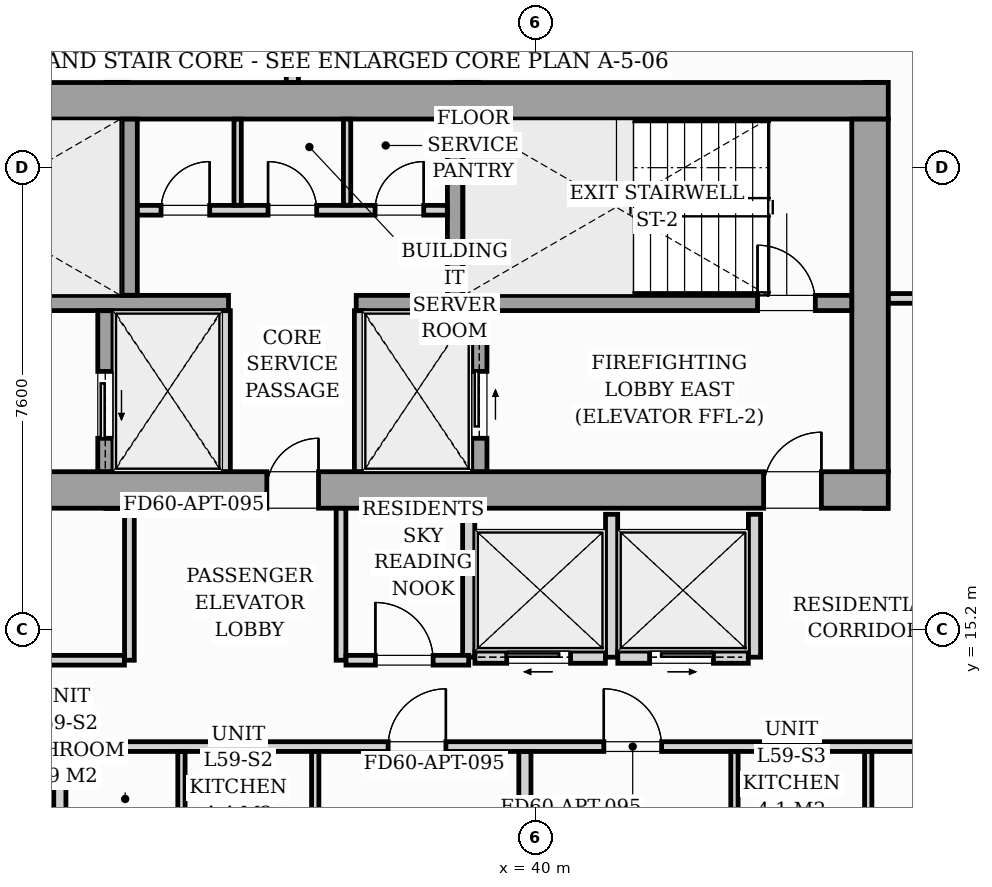
"""IFC4 building model, lengths in metres.
Left out: names, types, materials, properties, quantities, classifications, styles, units other than length and angle.
Written with IfcOpenShell. Run it as: python <this file> out.ifc"""

import sys

from ifc_helpers import new_model, si_unit, direction, frame, frame_2d, origin, origin_2d, place, context, subcontext, project, spatial, rectangle, i_section, extrude, source, transform, mapped, element, fill, save


model = new_model("IFC4")
c1 = context("Model", 3, precision=1e-05, world=origin(), true_north=direction((0.0, 1.0)))
c2 = subcontext(c1, "Body", "Model", "MODEL_VIEW")
j1 = project(units=[si_unit("LENGTHUNIT", "METRE"), si_unit("PLANEANGLEUNIT", "RADIAN")], contexts=[c1])
p1 = place(None, origin())
s1 = spatial("IfcSite", under=j1, at=p1, CompositionType="ELEMENT")
p2 = place(p1, origin())
s2 = spatial("IfcBuilding", under=s1, at=p2, CompositionType="ELEMENT")
p3 = place(p2, frame((0.0, 0.0, 205.0)))
s3 = spatial("IfcBuildingStorey", under=s2, at=p3, CompositionType="ELEMENT", Elevation=205.0)
m1 = source(origin(), c2, "Body", "SweptSolid", [
    extrude(i_section(OverallWidth=0.416, OverallDepth=0.446, WebThickness=0.039, FlangeThickness=0.063, FilletRadius=0.018, at=origin_2d()), origin(), (0.0, 0.0, 1.0), 3.196),
])
for number, where, z_axis, x_axis in (
    (1, (33.12, 17.4, 0.002), (0.0, 0.0, 1.0), (1.0, 0.0, 0.0)),
    (2, (38.88, 17.4, 0.002), (0.0, 0.0, 1.0), (1.0, 0.0, 0.0)),
    (3, (45.6, 17.4, 0.002), (0.0, 0.0, 1.0), (1.0, 0.0, 0.0)),
    (4, (33.12, 24.0, 0.002), (0.0, 0.0, 1.0), (1.0, 0.0, 0.0)),
    (5, (38.88, 24.0, 0.002), (0.0, 0.0, 1.0), (1.0, 0.0, 0.0)),
    (6, (45.6, 24.0, 0.002), (0.0, 0.0, 1.0), (1.0, 0.0, 0.0)),
):
    element("IfcColumn", number, at=place(p3, frame(where, z_axis=z_axis, x_axis=x_axis)), inside=s3, PredefinedType="PILASTER", context=c2, shape_type="MappedRepresentation", body=[
        mapped(m1, transform((0.0, 0.0, 0.0), scale=1.0)),
    ])
p4 = place(p3, frame((26.2, 17.5, 0.0), z_axis=(0.0, 0.0, 1.0), x_axis=(1.0, 0.0, 0.0)))
e7 = element("IfcWall", 7, at=p4, inside=s3, PredefinedType="SHEAR", context=c2, shape_type="SweptSolid", body=[
    extrude(rectangle(XDim=19.6, YDim=0.6, at=frame_2d((9.8, 0.0))), origin(), (0.0, 0.0, 1.0), 3.2),
])
p5 = place(p4, frame((0.95, 0.0, 0.0)))
e8 = element("IfcOpeningElement", 8, at=p5, cuts=e7, PredefinedType="OPENING", context=c2, shape_type="SweptSolid", body=[
    extrude(rectangle(XDim=0.95, YDim=2.06, at=frame_2d((0.475, 1.03))), frame((0.0, 0.31, 0.0), z_axis=(0.0, -1.0, 0.0), x_axis=(1.0, 0.0, 0.0)), (0.0, 0.0, 1.0), 0.62),
])
p6 = place(p4, frame((9.38, 0.0, 0.0)))
e9 = element("IfcOpeningElement", 9, at=p6, cuts=e7, PredefinedType="OPENING", context=c2, shape_type="SweptSolid", body=[
    extrude(rectangle(XDim=0.85, YDim=2.0, at=frame_2d((0.425, 1.0))), frame((0.0, 0.31, 0.0), z_axis=(0.0, -1.0, 0.0), x_axis=(1.0, 0.0, 0.0)), (0.0, 0.0, 1.0), 0.62),
])
p7 = place(p4, frame((17.55, 0.0, 0.0)))
e10 = element("IfcOpeningElement", 10, at=p7, cuts=e7, PredefinedType="OPENING", context=c2, shape_type="SweptSolid", body=[
    extrude(rectangle(XDim=0.95, YDim=2.06, at=frame_2d((0.475, 1.03))), frame((0.0, 0.31, 0.0), z_axis=(0.0, -1.0, 0.0), x_axis=(1.0, 0.0, 0.0)), (0.0, 0.0, 1.0), 0.62),
])
p8 = place(p3, frame((26.2, 23.9, 0.0), z_axis=(0.0, 0.0, 1.0), x_axis=(1.0, 0.0, 0.0)))
e11 = element("IfcWall", 11, at=p8, inside=s3, PredefinedType="SHEAR", context=c2, shape_type="SweptSolid", body=[
    extrude(rectangle(XDim=19.6, YDim=0.6, at=frame_2d((9.8, 0.0))), origin(), (0.0, 0.0, 1.0), 3.2),
])
p9 = place(p3, frame((45.5, 17.802, 0.0), z_axis=(0.0, 0.0, 1.0), x_axis=(0.0, 1.0, 0.0)))
e12 = element("IfcWall", 12, at=p9, inside=s3, PredefinedType="SHEAR", context=c2, shape_type="SweptSolid", body=[
    extrude(rectangle(XDim=5.796, YDim=0.6, at=frame_2d((2.898, 0.0))), origin(), (0.0, 0.0, 1.0), 3.2),
])
p10 = place(p3, frame((26.802, 20.575, 0.0), z_axis=(0.0, 0.0, 1.0), x_axis=(1.0, 0.0, 0.0)))
e13 = element("IfcWall", 13, at=p10, inside=s3, PredefinedType="SOLIDWALL", context=c2, shape_type="SweptSolid", body=[
    extrude(rectangle(XDim=8.148, YDim=0.25, at=frame_2d((4.074, 0.0))), origin(), (0.0, 0.0, 1.0), 3.2),
])
p11 = place(p10, frame((0.298, 0.0, 0.0)))
e14 = element("IfcOpeningElement", 14, at=p11, cuts=e13, PredefinedType="OPENING", context=c2, shape_type="SweptSolid", body=[
    extrude(rectangle(XDim=0.95, YDim=2.06, at=frame_2d((0.475, 1.03))), frame((0.0, 0.135, 0.0), z_axis=(0.0, -1.0, 0.0), x_axis=(1.0, 0.0, 0.0)), (0.0, 0.0, 1.0), 0.27),
])
p12 = place(p3, frame((37.05, 20.575, 0.0), z_axis=(0.0, 0.0, 1.0), x_axis=(1.0, 0.0, 0.0)))
e15 = element("IfcWall", 15, at=p12, inside=s3, PredefinedType="SOLIDWALL", context=c2, shape_type="SweptSolid", body=[
    extrude(rectangle(XDim=8.148, YDim=0.25, at=frame_2d((4.074, 0.0))), origin(), (0.0, 0.0, 1.0), 3.2),
])
p13 = place(p12, frame((6.6, 0.0, 0.0)))
e16 = element("IfcOpeningElement", 16, at=p13, cuts=e15, PredefinedType="OPENING", context=c2, shape_type="SweptSolid", body=[
    extrude(rectangle(XDim=0.95, YDim=2.06, at=frame_2d((0.475, 1.03))), frame((0.0, 0.135, 0.0), z_axis=(0.0, -1.0, 0.0), x_axis=(1.0, 0.0, 0.0)), (0.0, 0.0, 1.0), 0.27),
])
for number, where, z_axis, x_axis in (
    (17, (33.325, 20.702, 0.0), (0.0, 0.0, 1.0), (0.0, 1.0, 0.0)),
    (18, (38.675, 20.702, 0.0), (0.0, 0.0, 1.0), (0.0, 1.0, 0.0)),
):
    element("IfcWall", number, at=place(p3, frame(where, z_axis=z_axis, x_axis=x_axis)), inside=s3, PredefinedType="SOLIDWALL", context=c2, shape_type="SweptSolid", body=[
        extrude(rectangle(XDim=2.896, YDim=0.25, at=frame_2d((1.448, 0.0))), origin(), (0.0, 0.0, 1.0), 3.2),
    ])
p14 = place(p3, frame((32.925, 17.802, 0.0), z_axis=(0.0, 0.0, 1.0), x_axis=(0.0, 1.0, 0.0)))
e19 = element("IfcWall", 19, at=p14, inside=s3, PredefinedType="SOLIDWALL", context=c2, shape_type="SweptSolid", body=[
    extrude(rectangle(XDim=2.646, YDim=0.25, at=frame_2d((1.323, 0.0))), origin(), (0.0, 0.0, 1.0), 3.2),
])
p15 = place(p14, frame((0.548, 0.0, 0.0)))
e20 = element("IfcOpeningElement", 20, at=p15, cuts=e19, PredefinedType="OPENING", context=c2, shape_type="SweptSolid", body=[
    extrude(rectangle(XDim=1.1, YDim=2.08, at=frame_2d((0.55, 1.04))), frame((0.0, 0.135, 0.0), z_axis=(0.0, -1.0, 0.0), x_axis=(1.0, 0.0, 0.0)), (0.0, 0.0, 1.0), 0.27),
])
for number, where, z_axis, x_axis in (
    (21, (34.9, 17.802, 0.0), (0.0, 0.0, 1.0), (0.0, 1.0, 0.0)),
    (22, (37.1, 17.802, 0.0), (0.0, 0.0, 1.0), (0.0, 1.0, 0.0)),
):
    element("IfcWall", number, at=place(p3, frame(where, z_axis=z_axis, x_axis=x_axis)), inside=s3, PredefinedType="PARTITIONING", context=c2, shape_type="SweptSolid", body=[
        extrude(rectangle(XDim=2.646, YDim=0.16, at=frame_2d((1.323, 0.0))), origin(), (0.0, 0.0, 1.0), 2.94),
    ])
p16 = place(p3, frame((39.075, 17.802, 0.0), z_axis=(0.0, 0.0, 1.0), x_axis=(0.0, 1.0, 0.0)))
e23 = element("IfcWall", 23, at=p16, inside=s3, PredefinedType="SOLIDWALL", context=c2, shape_type="SweptSolid", body=[
    extrude(rectangle(XDim=2.646, YDim=0.25, at=frame_2d((1.323, 0.0))), origin(), (0.0, 0.0, 1.0), 3.2),
])
p17 = place(p16, frame((0.548, 0.0, 0.0)))
e24 = element("IfcOpeningElement", 24, at=p17, cuts=e23, PredefinedType="OPENING", context=c2, shape_type="SweptSolid", body=[
    extrude(rectangle(XDim=1.1, YDim=2.08, at=frame_2d((0.55, 1.04))), frame((0.0, 0.135, 0.0), z_axis=(0.0, -1.0, 0.0), x_axis=(1.0, 0.0, 0.0)), (0.0, 0.0, 1.0), 0.27),
])
p18 = place(p3, frame((33.452, 22.1, 0.0), z_axis=(0.0, 0.0, 1.0), x_axis=(1.0, 0.0, 0.0)))
e25 = element("IfcWall", 25, at=p18, inside=s3, PredefinedType="PARTITIONING", context=c2, shape_type="SweptSolid", body=[
    extrude(rectangle(XDim=5.096, YDim=0.16, at=frame_2d((2.548, 0.0))), origin(), (0.0, 0.0, 1.0), 2.94),
])
p19 = place(p18, frame((0.388, 0.0, 0.0)))
e26 = element("IfcOpeningElement", 26, at=p19, cuts=e25, PredefinedType="OPENING", context=c2, shape_type="SweptSolid", body=[
    extrude(rectangle(XDim=0.8, YDim=2.05, at=frame_2d((0.4, 1.025))), frame((0.0, 0.09, 0.0), z_axis=(0.0, -1.0, 0.0), x_axis=(1.0, 0.0, 0.0)), (0.0, 0.0, 1.0), 0.18),
])
p20 = place(p18, frame((2.148, 0.0, 0.0)))
e27 = element("IfcOpeningElement", 27, at=p20, cuts=e25, PredefinedType="OPENING", context=c2, shape_type="SweptSolid", body=[
    extrude(rectangle(XDim=0.8, YDim=2.05, at=frame_2d((0.4, 1.025))), frame((0.0, 0.09, 0.0), z_axis=(0.0, -1.0, 0.0), x_axis=(1.0, 0.0, 0.0)), (0.0, 0.0, 1.0), 0.18),
])
p21 = place(p18, frame((3.908, 0.0, 0.0)))
e28 = element("IfcOpeningElement", 28, at=p21, cuts=e25, PredefinedType="OPENING", context=c2, shape_type="SweptSolid", body=[
    extrude(rectangle(XDim=0.8, YDim=2.05, at=frame_2d((0.4, 1.025))), frame((0.0, 0.09, 0.0), z_axis=(0.0, -1.0, 0.0), x_axis=(1.0, 0.0, 0.0)), (0.0, 0.0, 1.0), 0.18),
])
for number, where, z_axis, x_axis in (
    (29, (35.1, 22.182, 0.0), (0.0, 0.0, 1.0), (0.0, 1.0, 0.0)),
    (30, (36.9, 22.182, 0.0), (0.0, 0.0, 1.0), (0.0, 1.0, 0.0)),
):
    element("IfcWall", number, at=place(p3, frame(where, z_axis=z_axis, x_axis=x_axis)), inside=s3, PredefinedType="PARTITIONING", context=c2, shape_type="SweptSolid", body=[
        extrude(rectangle(XDim=1.416, YDim=0.12, at=frame_2d((0.708, 0.0))), origin(), (0.0, 0.0, 1.0), 2.94),
    ])
for number, where, z_axis, x_axis in (
    (31, (38.9, 14.75, 0.0), (0.0, 0.0, 1.0), (0.0, 1.0, 0.0)),
    (32, (41.25, 14.75, 0.0), (0.0, 0.0, 1.0), (0.0, 1.0, 0.0)),
    (33, (43.6, 14.75, 0.0), (0.0, 0.0, 1.0), (0.0, 1.0, 0.0)),
):
    element("IfcWall", number, at=place(p3, frame(where, z_axis=z_axis, x_axis=x_axis)), inside=s3, PredefinedType="PARTITIONING", context=c2, shape_type="SweptSolid", body=[
        extrude(rectangle(XDim=2.35, YDim=0.2, at=frame_2d((1.175, 0.0))), origin(), (0.0, 0.0, 1.0), 2.94),
    ])
p22 = place(p3, frame((39.002, 14.75, 0.0), z_axis=(0.0, 0.0, 1.0), x_axis=(1.0, 0.0, 0.0)))
e34 = element("IfcWall", 34, at=p22, inside=s3, PredefinedType="PARTITIONING", context=c2, shape_type="SweptSolid", body=[
    extrude(rectangle(XDim=2.146, YDim=0.2, at=frame_2d((1.073, 0.0))), origin(), (0.0, 0.0, 1.0), 2.94),
])
p23 = place(p22, frame((0.523, 0.0, 0.0)))
e35 = element("IfcOpeningElement", 35, at=p23, cuts=e34, PredefinedType="OPENING", context=c2, shape_type="SweptSolid", body=[
    extrude(rectangle(XDim=1.05, YDim=2.08, at=frame_2d((0.525, 1.04))), frame((0.0, 0.11, 0.0), z_axis=(0.0, -1.0, 0.0), x_axis=(1.0, 0.0, 0.0)), (0.0, 0.0, 1.0), 0.22),
])
p24 = place(p3, frame((41.352, 14.75, 0.0), z_axis=(0.0, 0.0, 1.0), x_axis=(1.0, 0.0, 0.0)))
e36 = element("IfcWall", 36, at=p24, inside=s3, PredefinedType="PARTITIONING", context=c2, shape_type="SweptSolid", body=[
    extrude(rectangle(XDim=2.146, YDim=0.2, at=frame_2d((1.073, 0.0))), origin(), (0.0, 0.0, 1.0), 2.94),
])
p25 = place(p24, frame((0.523, 0.0, 0.0)))
e37 = element("IfcOpeningElement", 37, at=p25, cuts=e36, PredefinedType="OPENING", context=c2, shape_type="SweptSolid", body=[
    extrude(rectangle(XDim=1.05, YDim=2.08, at=frame_2d((0.525, 1.04))), frame((0.0, 0.11, 0.0), z_axis=(0.0, -1.0, 0.0), x_axis=(1.0, 0.0, 0.0)), (0.0, 0.0, 1.0), 0.22),
])
p26 = place(p3, frame((24.55, 13.28, 0.0), z_axis=(0.0, 0.0, 1.0), x_axis=(1.0, 0.0, 0.0)))
e38 = element("IfcWall", 38, at=p26, inside=s3, PredefinedType="PARTITIONING", context=c2, shape_type="SweptSolid", body=[
    extrude(rectangle(XDim=22.9, YDim=0.16, at=frame_2d((11.45, 0.0))), origin(), (0.0, 0.0, 1.0), 2.94),
])
p27 = place(p26, frame((5.378, 0.0, 0.0)))
e39 = element("IfcOpeningElement", 39, at=p27, cuts=e38, PredefinedType="OPENING", context=c2, shape_type="SweptSolid", body=[
    extrude(rectangle(XDim=0.95, YDim=2.06, at=frame_2d((0.475, 1.03))), frame((0.0, 0.09, 0.0), z_axis=(0.0, -1.0, 0.0), x_axis=(1.0, 0.0, 0.0)), (0.0, 0.0, 1.0), 0.18),
])
p28 = place(p26, frame((13.025, 0.0, 0.0)))
e40 = element("IfcOpeningElement", 40, at=p28, cuts=e38, PredefinedType="OPENING", context=c2, shape_type="SweptSolid", body=[
    extrude(rectangle(XDim=0.95, YDim=2.06, at=frame_2d((0.475, 1.03))), frame((0.0, 0.09, 0.0), z_axis=(0.0, -1.0, 0.0), x_axis=(1.0, 0.0, 0.0)), (0.0, 0.0, 1.0), 0.18),
])
p29 = place(p26, frame((16.572, 0.0, 0.0)))
e41 = element("IfcOpeningElement", 41, at=p29, cuts=e38, PredefinedType="OPENING", context=c2, shape_type="SweptSolid", body=[
    extrude(rectangle(XDim=0.95, YDim=2.06, at=frame_2d((0.475, 1.03))), frame((0.0, 0.09, 0.0), z_axis=(0.0, -1.0, 0.0), x_axis=(1.0, 0.0, 0.0)), (0.0, 0.0, 1.0), 0.18),
])
p30 = place(p3, frame((36.0, 24.202, 0.0), z_axis=(0.0, 0.0, 1.0), x_axis=(0.0, 1.0, 0.0)))
e42 = element("IfcWall", 42, at=p30, inside=s3, PredefinedType="PARTITIONING", context=c2, shape_type="SweptSolid", body=[
    extrude(rectangle(XDim=2.152, YDim=0.2, at=frame_2d((1.076, 0.0))), origin(), (0.0, 0.0, 1.0), 2.94),
])
p31 = place(p3, frame((45.802, 20.65, 0.0), z_axis=(0.0, 0.0, 1.0), x_axis=(1.0, 0.0, 0.0)))
e43 = element("IfcWall", 43, at=p31, inside=s3, PredefinedType="PARTITIONING", context=c2, shape_type="SweptSolid", body=[
    extrude(rectangle(XDim=1.566, YDim=0.16, at=frame_2d((0.783, 0.0))), origin(), (0.0, 0.0, 1.0), 2.94),
])
p32 = place(p3, frame((32.176, 7.844, 0.0), z_axis=(0.0, 0.0, 1.0), x_axis=(0.0, 1.0, 0.0)))
e44 = element("IfcWall", 44, at=p32, inside=s3, PredefinedType="PARTITIONING", context=c2, shape_type="SweptSolid", body=[
    extrude(rectangle(XDim=5.354, YDim=0.2, at=frame_2d((2.677, 0.0))), origin(), (0.0, 0.0, 1.0), 2.94),
])
for number, where, z_axis, x_axis in (
    (45, (36.376, 11.092, 0.0), (0.0, 0.0, 1.0), (0.0, 1.0, 0.0)),
    (46, (34.176, 11.092, 0.0), (0.0, 0.0, 1.0), (0.0, 1.0, 0.0)),
):
    element("IfcWall", number, at=place(p3, frame(where, z_axis=z_axis, x_axis=x_axis)), inside=s3, PredefinedType="PARTITIONING", context=c2, shape_type="SweptSolid", body=[
        extrude(rectangle(XDim=2.106, YDim=0.12, at=frame_2d((1.053, 0.0))), origin(), (0.0, 0.0, 1.0), 2.94),
    ])
p33 = place(p3, frame((39.824, 8.398, 0.0), z_axis=(0.0, 0.0, 1.0), x_axis=(0.0, 1.0, 0.0)))
e47 = element("IfcWall", 47, at=p33, inside=s3, PredefinedType="PARTITIONING", context=c2, shape_type="SweptSolid", body=[
    extrude(rectangle(XDim=4.8, YDim=0.2, at=frame_2d((2.4, 0.0))), origin(), (0.0, 0.0, 1.0), 2.94),
])
for number, where, z_axis, x_axis in (
    (48, (43.27, 11.234, 0.0), (0.0, 0.0, 1.0), (0.0, 1.0, 0.0)),
    (49, (45.47, 11.234, 0.0), (0.0, 0.0, 1.0), (0.0, 1.0, 0.0)),
):
    element("IfcWall", number, at=place(p3, frame(where, z_axis=z_axis, x_axis=x_axis)), inside=s3, PredefinedType="PARTITIONING", context=c2, shape_type="SweptSolid", body=[
        extrude(rectangle(XDim=1.964, YDim=0.12, at=frame_2d((0.982, 0.0))), origin(), (0.0, 0.0, 1.0), 2.94),
    ])
p34 = place(p3, frame((33.32, 14.7, 0.0), z_axis=(0.0, 0.0, 1.0), x_axis=(0.0, 1.0, 0.0)))
e50 = element("IfcWall", 50, at=p34, inside=s3, PredefinedType="PARTITIONING", context=c2, shape_type="SweptSolid", body=[
    extrude(rectangle(XDim=2.498, YDim=0.16, at=frame_2d((1.249, 0.0))), origin(), (0.0, 0.0, 1.0), 2.94),
])
p35 = place(p3, frame((28.442, 14.7, 0.0), z_axis=(0.0, 0.0, 1.0), x_axis=(1.0, 0.0, 0.0)))
e51 = element("IfcWall", 51, at=p35, inside=s3, PredefinedType="PARTITIONING", context=c2, shape_type="SweptSolid", body=[
    extrude(rectangle(XDim=4.796, YDim=0.16, at=frame_2d((2.398, 0.0))), origin(), (0.0, 0.0, 1.0), 2.94),
])
p36 = place(p35, frame((1.923, 0.0, 0.0)))
e52 = element("IfcOpeningElement", 52, at=p36, cuts=e51, PredefinedType="OPENING", context=c2, shape_type="SweptSolid", body=[
    extrude(rectangle(XDim=0.95, YDim=2.06, at=frame_2d((0.475, 1.03))), frame((0.0, 0.09, 0.0), z_axis=(0.0, -1.0, 0.0), x_axis=(1.0, 0.0, 0.0)), (0.0, 0.0, 1.0), 0.18),
])
p37 = place(p3, frame((36.8, 14.7, 0.0), z_axis=(0.0, 0.0, 1.0), x_axis=(0.0, 1.0, 0.0)))
e53 = element("IfcWall", 53, at=p37, inside=s3, PredefinedType="PARTITIONING", context=c2, shape_type="SweptSolid", body=[
    extrude(rectangle(XDim=2.498, YDim=0.16, at=frame_2d((1.249, 0.0))), origin(), (0.0, 0.0, 1.0), 2.94),
])
p38 = place(p3, frame((36.882, 14.7, 0.0), z_axis=(0.0, 0.0, 1.0), x_axis=(1.0, 0.0, 0.0)))
e54 = element("IfcWall", 54, at=p38, inside=s3, PredefinedType="PARTITIONING", context=c2, shape_type="SweptSolid", body=[
    extrude(rectangle(XDim=2.018, YDim=0.16, at=frame_2d((1.009, 0.0))), origin(), (0.0, 0.0, 1.0), 2.94),
])
p39 = place(p38, frame((0.483, 0.0, 0.0)))
e55 = element("IfcOpeningElement", 55, at=p39, cuts=e54, PredefinedType="OPENING", context=c2, shape_type="SweptSolid", body=[
    extrude(rectangle(XDim=0.95, YDim=2.06, at=frame_2d((0.475, 1.03))), frame((0.0, 0.09, 0.0), z_axis=(0.0, -1.0, 0.0), x_axis=(1.0, 0.0, 0.0)), (0.0, 0.0, 1.0), 0.18),
])
m2 = source(origin(), c2, "Body", "SweptSolid", [
    extrude(rectangle(XDim=0.85, YDim=2.0, at=frame_2d((0.425, 1.0))), frame((0.0, 0.025, 0.0), z_axis=(0.0, -1.0, 0.0), x_axis=(1.0, 0.0, 0.0)), (0.0, 0.0, 1.0), 0.05),
])
p40 = place(p6, origin())
e56 = element("IfcDoor", 56, at=p40, inside=s3, OperationType="SINGLE_SWING_RIGHT", PredefinedType="DOOR", context=c2, shape_type="MappedRepresentation", body=[
    mapped(m2, transform((0.0, 0.0, 0.0), scale=1.0)),
])
fill(e9, e56)
m3 = source(origin(), c2, "Body", "SweptSolid", [
    extrude(rectangle(XDim=0.95, YDim=2.06, at=frame_2d((0.475, 1.03))), frame((0.0, 0.025, 0.0), z_axis=(0.0, -1.0, 0.0), x_axis=(1.0, 0.0, 0.0)), (0.0, 0.0, 1.0), 0.05),
])
p41 = place(p7, origin())
e57 = element("IfcDoor", 57, at=p41, inside=s3, OperationType="SINGLE_SWING_RIGHT", PredefinedType="DOOR", context=c2, shape_type="MappedRepresentation", body=[
    mapped(m3, transform((0.0, 0.0, 0.0), scale=1.0)),
])
fill(e10, e57)
p42 = place(p13, origin())
e58 = element("IfcDoor", 58, at=p42, inside=s3, OperationType="SINGLE_SWING_LEFT", PredefinedType="DOOR", context=c2, shape_type="MappedRepresentation", body=[
    mapped(m3, transform((0.0, 0.0, 0.0), scale=1.0)),
])
fill(e16, e58)
m4 = source(origin(), c2, "Body", "SweptSolid", [
    extrude(rectangle(XDim=1.1, YDim=2.08, at=frame_2d((0.55, 1.04))), frame((0.0, 0.025, 0.0), z_axis=(0.0, -1.0, 0.0), x_axis=(1.0, 0.0, 0.0)), (0.0, 0.0, 1.0), 0.05),
])
p43 = place(p15, origin())
e59 = element("IfcDoor", 59, at=p43, inside=s3, OperationType="SLIDING_TO_LEFT", PredefinedType="DOOR", context=c2, shape_type="MappedRepresentation", body=[
    mapped(m4, transform((0.0, 0.0, 0.0), scale=1.0)),
])
fill(e20, e59)
p44 = place(p17, origin())
e60 = element("IfcDoor", 60, at=p44, inside=s3, OperationType="SLIDING_TO_RIGHT", PredefinedType="DOOR", context=c2, shape_type="MappedRepresentation", body=[
    mapped(m4, transform((0.0, 0.0, 0.0), scale=1.0)),
])
fill(e24, e60)
m5 = source(origin(), c2, "Body", "SweptSolid", [
    extrude(rectangle(XDim=0.8, YDim=2.05, at=frame_2d((0.4, 1.025))), frame((0.0, 0.025, 0.0), z_axis=(0.0, -1.0, 0.0), x_axis=(1.0, 0.0, 0.0)), (0.0, 0.0, 1.0), 0.05),
])
p45 = place(p19, origin())
e61 = element("IfcDoor", 61, at=p45, inside=s3, OperationType="SINGLE_SWING_RIGHT", PredefinedType="DOOR", context=c2, shape_type="MappedRepresentation", body=[
    mapped(m5, transform((0.0, 0.0, 0.0), scale=1.0)),
])
fill(e26, e61)
p46 = place(p20, origin())
e62 = element("IfcDoor", 62, at=p46, inside=s3, OperationType="SINGLE_SWING_LEFT", PredefinedType="DOOR", context=c2, shape_type="MappedRepresentation", body=[
    mapped(m5, transform((0.0, 0.0, 0.0), scale=1.0)),
])
fill(e27, e62)
p47 = place(p21, origin())
e63 = element("IfcDoor", 63, at=p47, inside=s3, OperationType="SINGLE_SWING_RIGHT", PredefinedType="DOOR", context=c2, shape_type="MappedRepresentation", body=[
    mapped(m5, transform((0.0, 0.0, 0.0), scale=1.0)),
])
fill(e28, e63)
m6 = source(origin(), c2, "Body", "SweptSolid", [
    extrude(rectangle(XDim=1.05, YDim=2.08, at=frame_2d((0.525, 1.04))), frame((0.0, 0.025, 0.0), z_axis=(0.0, -1.0, 0.0), x_axis=(1.0, 0.0, 0.0)), (0.0, 0.0, 1.0), 0.05),
])
p48 = place(p23, origin())
e64 = element("IfcDoor", 64, at=p48, inside=s3, OperationType="SLIDING_TO_LEFT", PredefinedType="DOOR", context=c2, shape_type="MappedRepresentation", body=[
    mapped(m6, transform((0.0, 0.0, 0.0), scale=1.0)),
])
fill(e35, e64)
p49 = place(p25, origin())
e65 = element("IfcDoor", 65, at=p49, inside=s3, OperationType="SLIDING_TO_RIGHT", PredefinedType="DOOR", context=c2, shape_type="MappedRepresentation", body=[
    mapped(m6, transform((0.0, 0.0, 0.0), scale=1.0)),
])
fill(e37, e65)
m7 = source(origin(), c2, "Body", "SweptSolid", [
    extrude(rectangle(XDim=0.95, YDim=2.06, at=frame_2d((0.475, 1.03))), frame((0.0, 0.025, 0.0), z_axis=(0.0, -1.0, 0.0), x_axis=(1.0, 0.0, 0.0)), (0.0, 0.0, 1.0), 0.05),
])
p50 = place(p28, origin())
e66 = element("IfcDoor", 66, at=p50, inside=s3, OperationType="SINGLE_SWING_RIGHT", PredefinedType="DOOR", context=c2, shape_type="MappedRepresentation", body=[
    mapped(m7, transform((0.0, 0.0, 0.0), scale=1.0)),
])
fill(e40, e66)
p51 = place(p29, origin())
e67 = element("IfcDoor", 67, at=p51, inside=s3, OperationType="SINGLE_SWING_LEFT", PredefinedType="DOOR", context=c2, shape_type="MappedRepresentation", body=[
    mapped(m7, transform((0.0, 0.0, 0.0), scale=1.0)),
])
fill(e41, e67)
p52 = place(p39, origin())
e68 = element("IfcDoor", 68, at=p52, inside=s3, OperationType="SINGLE_SWING_LEFT", PredefinedType="DOOR", context=c2, shape_type="MappedRepresentation", body=[
    mapped(m7, transform((0.0, 0.0, 0.0), scale=1.0)),
])
fill(e55, e68)
save(model, sys.argv[1])
